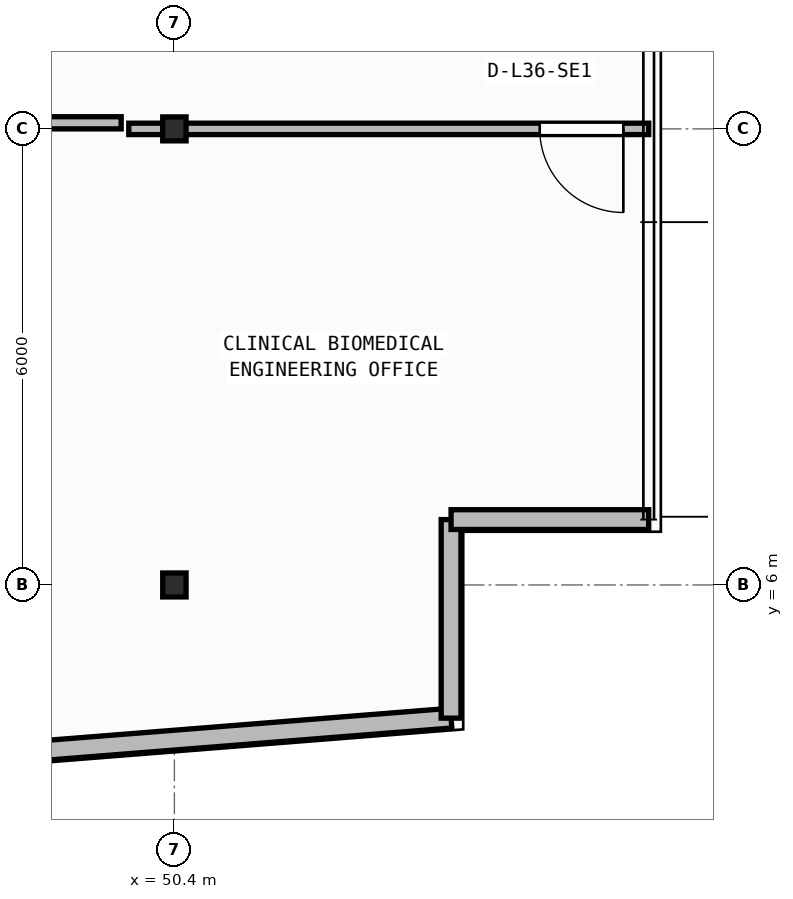
"""IFC4 building model, lengths in metres.
Left out: names, types, materials, properties, quantities, classifications, styles, units other than length and angle.
Written with IfcOpenShell. Run it as: python <this file> out.ifc"""

import sys

from ifc_helpers import new_model, si_unit, direction, frame, frame_2d, origin, origin_2d, place, context, subcontext, project, spatial, rectangle, i_section, extrude, element, fill, save


model = new_model("IFC4")
c1 = context("Model", 3, precision=1e-05, world=origin(), true_north=direction((0.0, 1.0)))
c2 = subcontext(c1, "Body", "Model", "MODEL_VIEW")
j1 = project(units=[si_unit("LENGTHUNIT", "METRE"), si_unit("PLANEANGLEUNIT", "RADIAN")], contexts=[c1])
p1 = place(None, origin())
s1 = spatial("IfcSite", under=j1, at=p1, CompositionType="ELEMENT")
p2 = place(p1, origin())
s2 = spatial("IfcBuilding", under=s1, at=p2, CompositionType="ELEMENT")
p3 = place(p2, frame((0.0, 0.0, 146.8)))
s3 = spatial("IfcBuildingStorey", under=s2, at=p3, CompositionType="ELEMENT", Elevation=146.8)
for number, where, z_axis, x_axis in (
    (1, (50.4, 6.0, 0.0), (0.0, 0.0, 1.0), (1.0, 0.0, 0.0)),
    (2, (50.4, 12.0, 0.0), (0.0, 0.0, 1.0), (1.0, 0.0, 0.0)),
):
    element("IfcColumn", number, at=place(p3, frame(where, z_axis=z_axis, x_axis=x_axis)), inside=s3, PredefinedType="COLUMN", context=c2, shape_type="SweptSolid", body=[
        extrude(i_section(OverallWidth=0.307, OverallDepth=0.315, WebThickness=0.012, FlangeThickness=0.019, FilletRadius=0.017, at=origin_2d()), origin(), (0.0, 0.0, 1.0), 3.95),
    ])
p4 = place(p3, frame((2.76, 0.173, 0.0), z_axis=(0.0, 0.0, 1.0), x_axis=(0.996857931723, 0.079210251617, 0.0)))
e3 = element("IfcWall", 3, at=p4, inside=s3, PredefinedType="STANDARD", context=c2, shape_type="SweptSolid", body=[
    extrude(rectangle(XDim=51.442, YDim=0.26, at=frame_2d((25.721, 0.0))), origin(), (0.0, 0.0, 1.0), 3.71),
])
p5 = place(p4, frame((24.521, 0.0, 0.9)))
e4 = element("IfcOpeningElement", 4, at=p5, cuts=e3, PredefinedType="OPENING", context=c2, shape_type="SweptSolid", body=[
    extrude(rectangle(XDim=2.4, YDim=1.65, at=frame_2d((1.2, 0.825))), frame((0.0, 0.14, 0.0), z_axis=(0.0, -1.0, 0.0), x_axis=(1.0, 0.0, 0.0)), (0.0, 0.0, 1.0), 0.28),
])
p6 = place(p3, frame((54.04, 4.248, 0.0), z_axis=(0.0, 0.0, 1.0), x_axis=(0.0, 1.0, 0.0)))
e5 = element("IfcWall", 5, at=p6, inside=s3, PredefinedType="STANDARD", context=c2, shape_type="SweptSolid", body=[
    extrude(rectangle(XDim=2.612, YDim=0.26, at=frame_2d((1.306, 0.0))), origin(), (0.0, 0.0, 1.0), 3.71),
])
p7 = place(p3, frame((54.04, 6.86, 0.0), z_axis=(0.0, 0.0, 1.0), x_axis=(1.0, 0.0, 0.0)))
e6 = element("IfcWall", 6, at=p7, inside=s3, PredefinedType="STANDARD", context=c2, shape_type="SweptSolid", body=[
    extrude(rectangle(XDim=2.6, YDim=0.26, at=frame_2d((1.3, 0.0))), origin(), (0.0, 0.0, 1.0), 3.71),
])
p8 = place(p3, frame((56.64, 12.0, 0.0), z_axis=(0.0, 0.0, 1.0), x_axis=(-1.0, 0.0, 0.0)))
e7 = element("IfcWall", 7, at=p8, inside=s3, PredefinedType="PARTITIONING", context=c2, shape_type="SweptSolid", body=[
    extrude(rectangle(XDim=6.84, YDim=0.15, at=frame_2d((3.42, 0.0))), origin(), (0.0, 0.0, 1.0), 3.083),
])
p9 = place(p8, frame((0.333, 0.0, 0.0)))
e8 = element("IfcOpeningElement", 8, at=p9, cuts=e7, PredefinedType="OPENING", context=c2, shape_type="SweptSolid", body=[
    extrude(rectangle(XDim=1.1, YDim=2.1, at=frame_2d((0.55, 1.05))), frame((0.0, 0.085, 0.0), z_axis=(0.0, -1.0, 0.0), x_axis=(1.0, 0.0, 0.0)), (0.0, 0.0, 1.0), 0.17),
])
p10 = place(p3, frame((46.689, 12.08, 0.0), z_axis=(0.0, 0.0, 1.0), x_axis=(1.0, 0.0, 0.0)))
e9 = element("IfcWall", 9, at=p10, inside=s3, PredefinedType="PARTITIONING", context=c2, shape_type="SweptSolid", body=[
    extrude(rectangle(XDim=3.011, YDim=0.16, at=frame_2d((1.505, 0.0))), origin(), (0.0, 0.0, 1.0), 3.083),
])
p11 = place(p9, origin())
e10 = element("IfcDoor", 10, at=p11, inside=s3, OperationType="SINGLE_SWING_LEFT", PredefinedType="DOOR", context=c2, shape_type="SweptSolid", body=[
    extrude(rectangle(XDim=1.1, YDim=2.1, at=frame_2d((0.55, 1.05))), frame((0.0, 0.025, 0.0), z_axis=(0.0, -1.0, 0.0), x_axis=(1.0, 0.0, 0.0)), (0.0, 0.0, 1.0), 0.05),
])
fill(e8, e10)
save(model, sys.argv[1])
